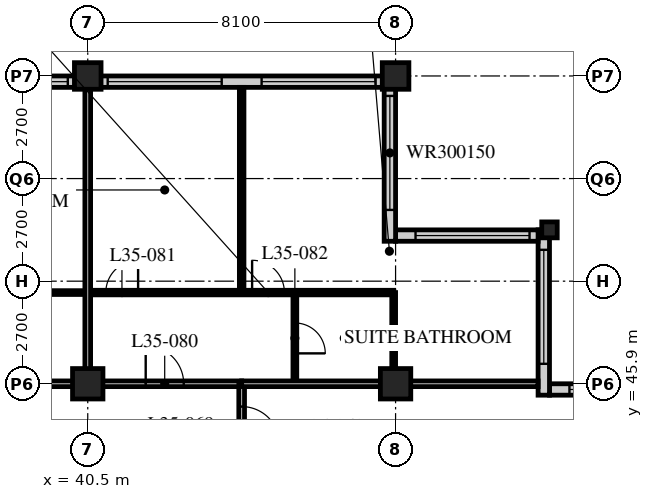
"""IFC4 building model, lengths in metres.
Left out: names, types, materials, properties, quantities, classifications, styles, units other than length and angle.
Written with IfcOpenShell. Run it as: python <this file> out.ifc"""

import sys

from ifc_helpers import new_model, si_unit, direction, frame, frame_2d, origin, origin_2d, place, context, subcontext, project, spatial, rectangle, hollow_rectangle, i_section, extrude, element, fill, save


model = new_model("IFC4")
c1 = context("Model", 3, precision=1e-05, world=origin(), true_north=direction((0.0, 1.0)))
c2 = subcontext(c1, "Body", "Model", "MODEL_VIEW")
j1 = project(units=[si_unit("LENGTHUNIT", "METRE"), si_unit("PLANEANGLEUNIT", "RADIAN")], contexts=[c1])
p1 = place(None, origin())
s1 = spatial("IfcSite", under=j1, at=p1, CompositionType="ELEMENT")
p2 = place(p1, origin())
s2 = spatial("IfcBuilding", under=s1, at=p2, CompositionType="ELEMENT")
p3 = place(p2, frame((0.0, 0.0, 137.4)))
s3 = spatial("IfcBuildingStorey", under=s2, at=p3, CompositionType="ELEMENT", Elevation=137.4)
p4 = place(p3, frame((40.5, 45.9, 0.0), z_axis=(0.0, 0.0, 1.0), x_axis=(1.0, 0.0, 0.0)))
e1 = element("IfcColumn", 1, at=p4, inside=s3, PredefinedType="COLUMN", context=c2, shape_type="SweptSolid", body=[
    extrude(hollow_rectangle(XDim=0.8, YDim=0.8, WallThickness=0.08, at=origin_2d()), origin(), (0.0, 0.0, 1.0), 3.4),
])
p5 = place(p3, frame((40.5, 54.0, 0.0), z_axis=(0.0, 0.0, 1.0), x_axis=(1.0, 0.0, 0.0)))
e2 = element("IfcColumn", 2, at=p5, inside=s3, PredefinedType="COLUMN", context=c2, shape_type="SweptSolid", body=[
    extrude(hollow_rectangle(XDim=0.7, YDim=0.7, WallThickness=0.07, at=origin_2d()), origin(), (0.0, 0.0, 1.0), 3.4),
])
p6 = place(p3, frame((48.6, 45.9, 0.0), z_axis=(0.0, 0.0, 1.0), x_axis=(1.0, 0.0, 0.0)))
e3 = element("IfcColumn", 3, at=p6, inside=s3, PredefinedType="COLUMN", context=c2, shape_type="SweptSolid", body=[
    extrude(hollow_rectangle(XDim=0.8, YDim=0.8, WallThickness=0.08, at=origin_2d()), origin(), (0.0, 0.0, 1.0), 3.4),
])
p7 = place(p3, frame((48.6, 54.0, 0.0), z_axis=(0.0, 0.0, 1.0), x_axis=(1.0, 0.0, 0.0)))
e4 = element("IfcColumn", 4, at=p7, inside=s3, PredefinedType="COLUMN", context=c2, shape_type="SweptSolid", body=[
    extrude(hollow_rectangle(XDim=0.7, YDim=0.7, WallThickness=0.07, at=origin_2d()), origin(), (0.0, 0.0, 1.0), 3.4),
])
p8 = place(p3, frame((52.65, 49.95, 0.0), z_axis=(0.0, 0.0, 1.0), x_axis=(1.0, 0.0, 0.0)))
e5 = element("IfcColumn", 5, at=p8, inside=s3, PredefinedType="COLUMN", context=c2, shape_type="SweptSolid", body=[
    extrude(i_section(OverallWidth=0.407, OverallDepth=0.419, WebThickness=0.031, FlangeThickness=0.049, FilletRadius=0.015, at=origin_2d()), origin(), (0.0, 0.0, 1.0), 3.4),
])
p9 = place(p3, frame((56.4, 45.75, 0.0), z_axis=(0.0, 0.0, 1.0), x_axis=(-1.0, 0.0, 0.0)))
e6 = element("IfcWall", 6, at=p9, inside=s3, PredefinedType="SOLIDWALL", context=c2, shape_type="SweptSolid", body=[
    extrude(rectangle(XDim=3.75, YDim=0.3, at=frame_2d((1.875, 0.0))), origin(), (0.0, 0.0, 1.0), 3.19),
])
p10 = place(p9, frame((0.225, 0.0, 0.9)))
e7 = element("IfcOpeningElement", 7, at=p10, cuts=e6, PredefinedType="OPENING", context=c2, shape_type="SweptSolid", body=[
    extrude(rectangle(XDim=3.0, YDim=1.5, at=frame_2d((1.5, 0.75))), frame((0.0, 0.16, 0.0), z_axis=(0.0, -1.0, 0.0), x_axis=(1.0, 0.0, 0.0)), (0.0, 0.0, 1.0), 0.32),
])
p11 = place(p3, frame((52.5, 45.6, 0.0), z_axis=(0.0, 0.0, 1.0), x_axis=(0.0, 1.0, 0.0)))
e8 = element("IfcWall", 8, at=p11, inside=s3, PredefinedType="SOLIDWALL", context=c2, shape_type="SweptSolid", body=[
    extrude(rectangle(XDim=4.35, YDim=0.3, at=frame_2d((2.175, 0.0))), origin(), (0.0, 0.0, 1.0), 3.19),
])
p12 = place(p11, frame((0.825, 0.0, 0.9)))
e9 = element("IfcOpeningElement", 9, at=p12, cuts=e8, PredefinedType="OPENING", context=c2, shape_type="SweptSolid", body=[
    extrude(rectangle(XDim=3.0, YDim=1.5, at=frame_2d((1.5, 0.75))), frame((0.0, 0.16, 0.0), z_axis=(0.0, -1.0, 0.0), x_axis=(1.0, 0.0, 0.0)), (0.0, 0.0, 1.0), 0.32),
])
p13 = place(p3, frame((52.35, 49.8, 0.0), z_axis=(0.0, 0.0, 1.0), x_axis=(-1.0, 0.0, 0.0)))
e10 = element("IfcWall", 10, at=p13, inside=s3, PredefinedType="SOLIDWALL", context=c2, shape_type="SweptSolid", body=[
    extrude(rectangle(XDim=3.75, YDim=0.3, at=frame_2d((1.875, 0.0))), origin(), (0.0, 0.0, 1.0), 3.19),
])
p14 = place(p13, frame((0.225, 0.0, 0.9)))
e11 = element("IfcOpeningElement", 11, at=p14, cuts=e10, PredefinedType="OPENING", context=c2, shape_type="SweptSolid", body=[
    extrude(rectangle(XDim=3.0, YDim=1.5, at=frame_2d((1.5, 0.75))), frame((0.0, 0.16, 0.0), z_axis=(0.0, -1.0, 0.0), x_axis=(1.0, 0.0, 0.0)), (0.0, 0.0, 1.0), 0.32),
])
p15 = place(p3, frame((48.45, 49.65, 0.0), z_axis=(0.0, 0.0, 1.0), x_axis=(0.0, 1.0, 0.0)))
e12 = element("IfcWall", 12, at=p15, inside=s3, PredefinedType="SOLIDWALL", context=c2, shape_type="SweptSolid", body=[
    extrude(rectangle(XDim=4.35, YDim=0.3, at=frame_2d((2.175, 0.0))), origin(), (0.0, 0.0, 1.0), 3.19),
])
p16 = place(p15, frame((0.825, 0.0, 0.9)))
e13 = element("IfcOpeningElement", 13, at=p16, cuts=e12, PredefinedType="OPENING", context=c2, shape_type="SweptSolid", body=[
    extrude(rectangle(XDim=3.0, YDim=1.5, at=frame_2d((1.5, 0.75))), frame((0.0, 0.16, 0.0), z_axis=(0.0, -1.0, 0.0), x_axis=(1.0, 0.0, 0.0)), (0.0, 0.0, 1.0), 0.32),
])
p17 = place(p3, frame((48.3, 53.85, 0.0), z_axis=(0.0, 0.0, 1.0), x_axis=(-1.0, 0.0, 0.0)))
e14 = element("IfcWall", 14, at=p17, inside=s3, PredefinedType="SOLIDWALL", context=c2, shape_type="SweptSolid", body=[
    extrude(rectangle(XDim=40.2, YDim=0.3, at=frame_2d((20.1, 0.0))), origin(), (0.0, 0.0, 1.0), 3.19),
])
p18 = place(p17, frame((0.225, 0.0, 0.9)))
e15 = element("IfcOpeningElement", 15, at=p18, cuts=e14, PredefinedType="OPENING", context=c2, shape_type="SweptSolid", body=[
    extrude(rectangle(XDim=3.0, YDim=2.0, at=frame_2d((1.5, 1.0))), frame((0.0, 0.16, 0.0), z_axis=(0.0, -1.0, 0.0), x_axis=(1.0, 0.0, 0.0)), (0.0, 0.0, 1.0), 0.32),
])
p19 = place(p17, frame((4.275, 0.0, 0.9)))
e16 = element("IfcOpeningElement", 16, at=p19, cuts=e14, PredefinedType="OPENING", context=c2, shape_type="SweptSolid", body=[
    extrude(rectangle(XDim=3.0, YDim=2.0, at=frame_2d((1.5, 1.0))), frame((0.0, 0.16, 0.0), z_axis=(0.0, -1.0, 0.0), x_axis=(1.0, 0.0, 0.0)), (0.0, 0.0, 1.0), 0.32),
])
p20 = place(p17, frame((8.325, 0.0, 0.9)))
e17 = element("IfcOpeningElement", 17, at=p20, cuts=e14, PredefinedType="OPENING", context=c2, shape_type="SweptSolid", body=[
    extrude(rectangle(XDim=3.0, YDim=2.0, at=frame_2d((1.5, 1.0))), frame((0.0, 0.16, 0.0), z_axis=(0.0, -1.0, 0.0), x_axis=(1.0, 0.0, 0.0)), (0.0, 0.0, 1.0), 0.32),
])
p21 = place(p17, frame((12.375, 0.0, 0.9)))
e18 = element("IfcOpeningElement", 18, at=p21, cuts=e14, PredefinedType="OPENING", context=c2, shape_type="SweptSolid", body=[
    extrude(rectangle(XDim=3.0, YDim=2.0, at=frame_2d((1.5, 1.0))), frame((0.0, 0.16, 0.0), z_axis=(0.0, -1.0, 0.0), x_axis=(1.0, 0.0, 0.0)), (0.0, 0.0, 1.0), 0.32),
])
p22 = place(p17, frame((16.425, 0.0, 0.9)))
e19 = element("IfcOpeningElement", 19, at=p22, cuts=e14, PredefinedType="OPENING", context=c2, shape_type="SweptSolid", body=[
    extrude(rectangle(XDim=3.0, YDim=2.0, at=frame_2d((1.5, 1.0))), frame((0.0, 0.16, 0.0), z_axis=(0.0, -1.0, 0.0), x_axis=(1.0, 0.0, 0.0)), (0.0, 0.0, 1.0), 0.32),
])
p23 = place(p17, frame((20.475, 0.0, 0.9)))
e20 = element("IfcOpeningElement", 20, at=p23, cuts=e14, PredefinedType="OPENING", context=c2, shape_type="SweptSolid", body=[
    extrude(rectangle(XDim=3.0, YDim=2.0, at=frame_2d((1.5, 1.0))), frame((0.0, 0.16, 0.0), z_axis=(0.0, -1.0, 0.0), x_axis=(1.0, 0.0, 0.0)), (0.0, 0.0, 1.0), 0.32),
])
p24 = place(p17, frame((24.525, 0.0, 0.9)))
e21 = element("IfcOpeningElement", 21, at=p24, cuts=e14, PredefinedType="OPENING", context=c2, shape_type="SweptSolid", body=[
    extrude(rectangle(XDim=3.0, YDim=2.0, at=frame_2d((1.5, 1.0))), frame((0.0, 0.16, 0.0), z_axis=(0.0, -1.0, 0.0), x_axis=(1.0, 0.0, 0.0)), (0.0, 0.0, 1.0), 0.32),
])
p25 = place(p17, frame((28.575, 0.0, 0.9)))
e22 = element("IfcOpeningElement", 22, at=p25, cuts=e14, PredefinedType="OPENING", context=c2, shape_type="SweptSolid", body=[
    extrude(rectangle(XDim=3.0, YDim=2.0, at=frame_2d((1.5, 1.0))), frame((0.0, 0.16, 0.0), z_axis=(0.0, -1.0, 0.0), x_axis=(1.0, 0.0, 0.0)), (0.0, 0.0, 1.0), 0.32),
])
p26 = place(p17, frame((32.625, 0.0, 0.9)))
e23 = element("IfcOpeningElement", 23, at=p26, cuts=e14, PredefinedType="OPENING", context=c2, shape_type="SweptSolid", body=[
    extrude(rectangle(XDim=3.0, YDim=2.0, at=frame_2d((1.5, 1.0))), frame((0.0, 0.16, 0.0), z_axis=(0.0, -1.0, 0.0), x_axis=(1.0, 0.0, 0.0)), (0.0, 0.0, 1.0), 0.32),
])
p27 = place(p17, frame((36.675, 0.0, 0.9)))
e24 = element("IfcOpeningElement", 24, at=p27, cuts=e14, PredefinedType="OPENING", context=c2, shape_type="SweptSolid", body=[
    extrude(rectangle(XDim=3.0, YDim=2.0, at=frame_2d((1.5, 1.0))), frame((0.0, 0.16, 0.0), z_axis=(0.0, -1.0, 0.0), x_axis=(1.0, 0.0, 0.0)), (0.0, 0.0, 1.0), 0.32),
])
p28 = place(p3, frame((8.1, 45.9, 0.0), z_axis=(0.0, 0.0, 1.0), x_axis=(1.0, 0.0, 0.0)))
e25 = element("IfcWall", 25, at=p28, inside=s3, PredefinedType="PARTITIONING", context=c2, shape_type="SweptSolid", body=[
    extrude(rectangle(XDim=36.45, YDim=0.15, at=frame_2d((18.225, 0.0))), origin(), (0.0, 0.0, 1.0), 2.578),
])
p29 = place(p28, frame((9.625, 0.0, 0.0)))
e26 = element("IfcOpeningElement", 26, at=p29, cuts=e25, PredefinedType="OPENING", context=c2, shape_type="SweptSolid", body=[
    extrude(rectangle(XDim=1.0, YDim=2.1, at=frame_2d((0.5, 1.05))), frame((0.0, 0.085, 0.0), z_axis=(0.0, -1.0, 0.0), x_axis=(1.0, 0.0, 0.0)), (0.0, 0.0, 1.0), 0.17),
])
p30 = place(p28, frame((21.775, 0.0, 0.0)))
e27 = element("IfcOpeningElement", 27, at=p30, cuts=e25, PredefinedType="OPENING", context=c2, shape_type="SweptSolid", body=[
    extrude(rectangle(XDim=1.0, YDim=2.1, at=frame_2d((0.5, 1.05))), frame((0.0, 0.085, 0.0), z_axis=(0.0, -1.0, 0.0), x_axis=(1.0, 0.0, 0.0)), (0.0, 0.0, 1.0), 0.17),
])
p31 = place(p28, frame((28.95, 0.0, 0.0)))
e28 = element("IfcOpeningElement", 28, at=p31, cuts=e25, PredefinedType="OPENING", context=c2, shape_type="SweptSolid", body=[
    extrude(rectangle(XDim=1.0, YDim=2.1, at=frame_2d((0.5, 1.05))), frame((0.0, 0.085, 0.0), z_axis=(0.0, -1.0, 0.0), x_axis=(1.0, 0.0, 0.0)), (0.0, 0.0, 1.0), 0.17),
])
p32 = place(p28, frame((33.925, 0.0, 0.0)))
e29 = element("IfcOpeningElement", 29, at=p32, cuts=e25, PredefinedType="OPENING", context=c2, shape_type="SweptSolid", body=[
    extrude(rectangle(XDim=1.0, YDim=2.1, at=frame_2d((0.5, 1.05))), frame((0.0, 0.085, 0.0), z_axis=(0.0, -1.0, 0.0), x_axis=(1.0, 0.0, 0.0)), (0.0, 0.0, 1.0), 0.17),
])
p33 = place(p28, frame((2.625, 0.0, 0.0)))
e30 = element("IfcOpeningElement", 30, at=p33, cuts=e25, PredefinedType="OPENING", context=c2, shape_type="SweptSolid", body=[
    extrude(rectangle(XDim=1.0, YDim=2.1, at=frame_2d((0.5, 1.05))), frame((0.0, 0.085, 0.0), z_axis=(0.0, -1.0, 0.0), x_axis=(1.0, 0.0, 0.0)), (0.0, 0.0, 1.0), 0.17),
])
p34 = place(p3, frame((44.55, 17.55, 0.0), z_axis=(0.0, 0.0, 1.0), x_axis=(0.0, 1.0, 0.0)))
e31 = element("IfcWall", 31, at=p34, inside=s3, PredefinedType="PARTITIONING", context=c2, shape_type="SweptSolid", body=[
    extrude(rectangle(XDim=28.35, YDim=0.15, at=frame_2d((14.175, 0.0))), origin(), (0.0, 0.0, 1.0), 3.19),
])
p35 = place(p34, frame((2.75, 0.0, 0.0)))
e32 = element("IfcOpeningElement", 32, at=p35, cuts=e31, PredefinedType="OPENING", context=c2, shape_type="SweptSolid", body=[
    extrude(rectangle(XDim=1.0, YDim=2.1, at=frame_2d((0.5, 1.05))), frame((0.0, 0.085, 0.0), z_axis=(0.0, -1.0, 0.0), x_axis=(1.0, 0.0, 0.0)), (0.0, 0.0, 1.0), 0.17),
])
p36 = place(p34, frame((6.5, 0.0, 0.0)))
e33 = element("IfcOpeningElement", 33, at=p36, cuts=e31, PredefinedType="OPENING", context=c2, shape_type="SweptSolid", body=[
    extrude(rectangle(XDim=1.0, YDim=2.1, at=frame_2d((0.5, 1.05))), frame((0.0, 0.085, 0.0), z_axis=(0.0, -1.0, 0.0), x_axis=(1.0, 0.0, 0.0)), (0.0, 0.0, 1.0), 0.17),
])
p37 = place(p34, frame((13.55, 0.0, 0.0)))
e34 = element("IfcOpeningElement", 34, at=p37, cuts=e31, PredefinedType="OPENING", context=c2, shape_type="SweptSolid", body=[
    extrude(rectangle(XDim=1.0, YDim=2.1, at=frame_2d((0.5, 1.05))), frame((0.0, 0.085, 0.0), z_axis=(0.0, -1.0, 0.0), x_axis=(1.0, 0.0, 0.0)), (0.0, 0.0, 1.0), 0.17),
])
p38 = place(p34, frame((18.1, 0.0, 0.0)))
e35 = element("IfcOpeningElement", 35, at=p38, cuts=e31, PredefinedType="OPENING", context=c2, shape_type="SweptSolid", body=[
    extrude(rectangle(XDim=1.0, YDim=2.1, at=frame_2d((0.5, 1.05))), frame((0.0, 0.085, 0.0), z_axis=(0.0, -1.0, 0.0), x_axis=(1.0, 0.0, 0.0)), (0.0, 0.0, 1.0), 0.17),
])
p39 = place(p34, frame((26.75, 0.0, 0.0)))
e36 = element("IfcOpeningElement", 36, at=p39, cuts=e31, PredefinedType="OPENING", context=c2, shape_type="SweptSolid", body=[
    extrude(rectangle(XDim=1.0, YDim=2.1, at=frame_2d((0.5, 1.05))), frame((0.0, 0.085, 0.0), z_axis=(0.0, -1.0, 0.0), x_axis=(1.0, 0.0, 0.0)), (0.0, 0.0, 1.0), 0.17),
])
p40 = place(p3, frame((38.2, 48.3, 0.0), z_axis=(0.0, 0.0, 1.0), x_axis=(1.0, 0.0, 0.0)))
e37 = element("IfcWall", 37, at=p40, inside=s3, PredefinedType="PARTITIONING", context=c2, shape_type="SweptSolid", body=[
    extrude(rectangle(XDim=2.3, YDim=0.1, at=frame_2d((1.15, 0.0))), origin(), (0.0, 0.0, 1.0), 3.19),
])
p41 = place(p3, frame((40.5, 48.3, 0.0), z_axis=(0.0, 0.0, 1.0), x_axis=(1.0, 0.0, 0.0)))
e38 = element("IfcWall", 38, at=p41, inside=s3, PredefinedType="PARTITIONING", context=c2, shape_type="SweptSolid", body=[
    extrude(rectangle(XDim=8.05, YDim=0.12, at=frame_2d((4.025, 0.0))), origin(), (0.0, 0.0, 1.0), 3.19),
])
p42 = place(p41, frame((0.475, 0.0, 0.0)))
e39 = element("IfcOpeningElement", 39, at=p42, cuts=e38, PredefinedType="OPENING", context=c2, shape_type="SweptSolid", body=[
    extrude(rectangle(XDim=0.85, YDim=2.1, at=frame_2d((0.425, 1.05))), frame((0.0, 0.07, 0.0), z_axis=(0.0, -1.0, 0.0), x_axis=(1.0, 0.0, 0.0)), (0.0, 0.0, 1.0), 0.14),
])
p43 = place(p41, frame((4.325, 0.0, 0.0)))
e40 = element("IfcOpeningElement", 40, at=p43, cuts=e38, PredefinedType="OPENING", context=c2, shape_type="SweptSolid", body=[
    extrude(rectangle(XDim=0.85, YDim=2.1, at=frame_2d((0.425, 1.05))), frame((0.0, 0.07, 0.0), z_axis=(0.0, -1.0, 0.0), x_axis=(1.0, 0.0, 0.0)), (0.0, 0.0, 1.0), 0.14),
])
p44 = place(p3, frame((45.95, 45.9, 0.0), z_axis=(0.0, 0.0, 1.0), x_axis=(0.0, 1.0, 0.0)))
e41 = element("IfcWall", 41, at=p44, inside=s3, PredefinedType="PARTITIONING", context=c2, shape_type="SweptSolid", body=[
    extrude(rectangle(XDim=2.4, YDim=0.1, at=frame_2d((1.2, 0.0))), origin(), (0.0, 0.0, 1.0), 3.19),
])
p45 = place(p44, frame((0.8, 0.0, 0.0)))
e42 = element("IfcOpeningElement", 42, at=p45, cuts=e41, PredefinedType="OPENING", context=c2, shape_type="SweptSolid", body=[
    extrude(rectangle(XDim=0.8, YDim=2.1, at=frame_2d((0.4, 1.05))), frame((0.0, 0.06, 0.0), z_axis=(0.0, -1.0, 0.0), x_axis=(1.0, 0.0, 0.0)), (0.0, 0.0, 1.0), 0.12),
])
p46 = place(p3, frame((48.55, 45.9, 0.0), z_axis=(0.0, 0.0, 1.0), x_axis=(0.0, 1.0, 0.0)))
e43 = element("IfcWall", 43, at=p46, inside=s3, PredefinedType="PARTITIONING", context=c2, shape_type="SweptSolid", body=[
    extrude(rectangle(XDim=2.4, YDim=0.1, at=frame_2d((1.2, 0.0))), origin(), (0.0, 0.0, 1.0), 2.578),
])
p47 = place(p3, frame((44.55, 48.3, 0.0), z_axis=(0.0, 0.0, 1.0), x_axis=(0.0, 1.0, 0.0)))
e44 = element("IfcWall", 44, at=p47, inside=s3, PredefinedType="PARTITIONING", context=c2, shape_type="SweptSolid", body=[
    extrude(rectangle(XDim=5.4, YDim=0.12, at=frame_2d((2.7, 0.0))), origin(), (0.0, 0.0, 1.0), 3.19),
])
for number, where, z_axis, x_axis in (
    (45, (44.55, 45.9, 0.0), (0.0, 0.0, 1.0), (1.0, 0.0, 0.0)),
    (46, (40.5, 45.9, 0.0), (0.0, 0.0, 1.0), (0.0, 1.0, 0.0)),
):
    element("IfcWall", number, at=place(p3, frame(where, z_axis=z_axis, x_axis=x_axis)), inside=s3, PredefinedType="PARTITIONING", context=c2, shape_type="SweptSolid", body=[
        extrude(rectangle(XDim=7.8, YDim=0.15, at=frame_2d((3.9, 0.0))), origin(), (0.0, 0.0, 1.0), 2.578),
    ])
p48 = place(p10, origin())
e47 = element("IfcWindow", 47, at=p48, inside=s3, PartitioningType="SINGLE_PANEL", PredefinedType="WINDOW", context=c2, shape_type="SweptSolid", body=[
    extrude(rectangle(XDim=3.0, YDim=1.5, at=frame_2d((1.5, 0.75))), frame((0.0, 0.03, 0.0), z_axis=(0.0, -1.0, 0.0), x_axis=(1.0, 0.0, 0.0)), (0.0, 0.0, 1.0), 0.06),
])
fill(e7, e47)
p49 = place(p12, origin())
e48 = element("IfcWindow", 48, at=p49, inside=s3, PartitioningType="SINGLE_PANEL", PredefinedType="WINDOW", context=c2, shape_type="SweptSolid", body=[
    extrude(rectangle(XDim=3.0, YDim=1.5, at=frame_2d((1.5, 0.75))), frame((0.0, 0.03, 0.0), z_axis=(0.0, -1.0, 0.0), x_axis=(1.0, 0.0, 0.0)), (0.0, 0.0, 1.0), 0.06),
])
fill(e9, e48)
p50 = place(p14, origin())
e49 = element("IfcWindow", 49, at=p50, inside=s3, PartitioningType="SINGLE_PANEL", PredefinedType="WINDOW", context=c2, shape_type="SweptSolid", body=[
    extrude(rectangle(XDim=3.0, YDim=1.5, at=frame_2d((1.5, 0.75))), frame((0.0, 0.03, 0.0), z_axis=(0.0, -1.0, 0.0), x_axis=(1.0, 0.0, 0.0)), (0.0, 0.0, 1.0), 0.06),
])
fill(e11, e49)
p51 = place(p16, origin())
e50 = element("IfcWindow", 50, at=p51, inside=s3, PartitioningType="SINGLE_PANEL", PredefinedType="WINDOW", context=c2, shape_type="SweptSolid", body=[
    extrude(rectangle(XDim=3.0, YDim=1.5, at=frame_2d((1.5, 0.75))), frame((0.0, 0.03, 0.0), z_axis=(0.0, -1.0, 0.0), x_axis=(1.0, 0.0, 0.0)), (0.0, 0.0, 1.0), 0.06),
])
fill(e13, e50)
p52 = place(p18, origin())
e51 = element("IfcWindow", 51, at=p52, inside=s3, PartitioningType="SINGLE_PANEL", PredefinedType="WINDOW", context=c2, shape_type="SweptSolid", body=[
    extrude(rectangle(XDim=3.0, YDim=2.0, at=frame_2d((1.5, 1.0))), frame((0.0, 0.03, 0.0), z_axis=(0.0, -1.0, 0.0), x_axis=(1.0, 0.0, 0.0)), (0.0, 0.0, 1.0), 0.06),
])
fill(e15, e51)
p53 = place(p19, origin())
e52 = element("IfcWindow", 52, at=p53, inside=s3, PartitioningType="SINGLE_PANEL", PredefinedType="WINDOW", context=c2, shape_type="SweptSolid", body=[
    extrude(rectangle(XDim=3.0, YDim=2.0, at=frame_2d((1.5, 1.0))), frame((0.0, 0.03, 0.0), z_axis=(0.0, -1.0, 0.0), x_axis=(1.0, 0.0, 0.0)), (0.0, 0.0, 1.0), 0.06),
])
fill(e16, e52)
p54 = place(p20, origin())
e53 = element("IfcWindow", 53, at=p54, inside=s3, PartitioningType="SINGLE_PANEL", PredefinedType="WINDOW", context=c2, shape_type="SweptSolid", body=[
    extrude(rectangle(XDim=3.0, YDim=2.0, at=frame_2d((1.5, 1.0))), frame((0.0, 0.03, 0.0), z_axis=(0.0, -1.0, 0.0), x_axis=(1.0, 0.0, 0.0)), (0.0, 0.0, 1.0), 0.06),
])
fill(e17, e53)
p55 = place(p39, origin())
e54 = element("IfcDoor", 54, at=p55, inside=s3, OperationType="SINGLE_SWING_RIGHT", PredefinedType="DOOR", context=c2, shape_type="SweptSolid", body=[
    extrude(rectangle(XDim=1.0, YDim=2.1, at=frame_2d((0.5, 1.05))), frame((0.0, 0.025, 0.0), z_axis=(0.0, -1.0, 0.0), x_axis=(1.0, 0.0, 0.0)), (0.0, 0.0, 1.0), 0.05),
])
fill(e36, e54)
p56 = place(p32, origin())
e55 = element("IfcDoor", 55, at=p56, inside=s3, OperationType="SINGLE_SWING_LEFT", PredefinedType="DOOR", context=c2, shape_type="SweptSolid", body=[
    extrude(rectangle(XDim=1.0, YDim=2.1, at=frame_2d((0.5, 1.05))), frame((0.0, 0.025, 0.0), z_axis=(0.0, -1.0, 0.0), x_axis=(1.0, 0.0, 0.0)), (0.0, 0.0, 1.0), 0.05),
])
fill(e29, e55)
p57 = place(p42, origin())
e56 = element("IfcDoor", 56, at=p57, inside=s3, OperationType="SINGLE_SWING_RIGHT", PredefinedType="DOOR", context=c2, shape_type="SweptSolid", body=[
    extrude(rectangle(XDim=0.85, YDim=2.1, at=frame_2d((0.425, 1.05))), frame((0.0, 0.025, 0.0), z_axis=(0.0, -1.0, 0.0), x_axis=(1.0, 0.0, 0.0)), (0.0, 0.0, 1.0), 0.05),
])
fill(e39, e56)
p58 = place(p45, origin())
e57 = element("IfcDoor", 57, at=p58, inside=s3, OperationType="SINGLE_SWING_RIGHT", PredefinedType="DOOR", context=c2, shape_type="SweptSolid", body=[
    extrude(rectangle(XDim=0.8, YDim=2.1, at=frame_2d((0.4, 1.05))), frame((0.0, 0.025, 0.0), z_axis=(0.0, -1.0, 0.0), x_axis=(1.0, 0.0, 0.0)), (0.0, 0.0, 1.0), 0.05),
])
fill(e42, e57)
p59 = place(p43, origin())
e58 = element("IfcDoor", 58, at=p59, inside=s3, OperationType="SINGLE_SWING_LEFT", PredefinedType="DOOR", context=c2, shape_type="SweptSolid", body=[
    extrude(rectangle(XDim=0.85, YDim=2.1, at=frame_2d((0.425, 1.05))), frame((0.0, 0.025, 0.0), z_axis=(0.0, -1.0, 0.0), x_axis=(1.0, 0.0, 0.0)), (0.0, 0.0, 1.0), 0.05),
])
fill(e40, e58)
save(model, sys.argv[1])
